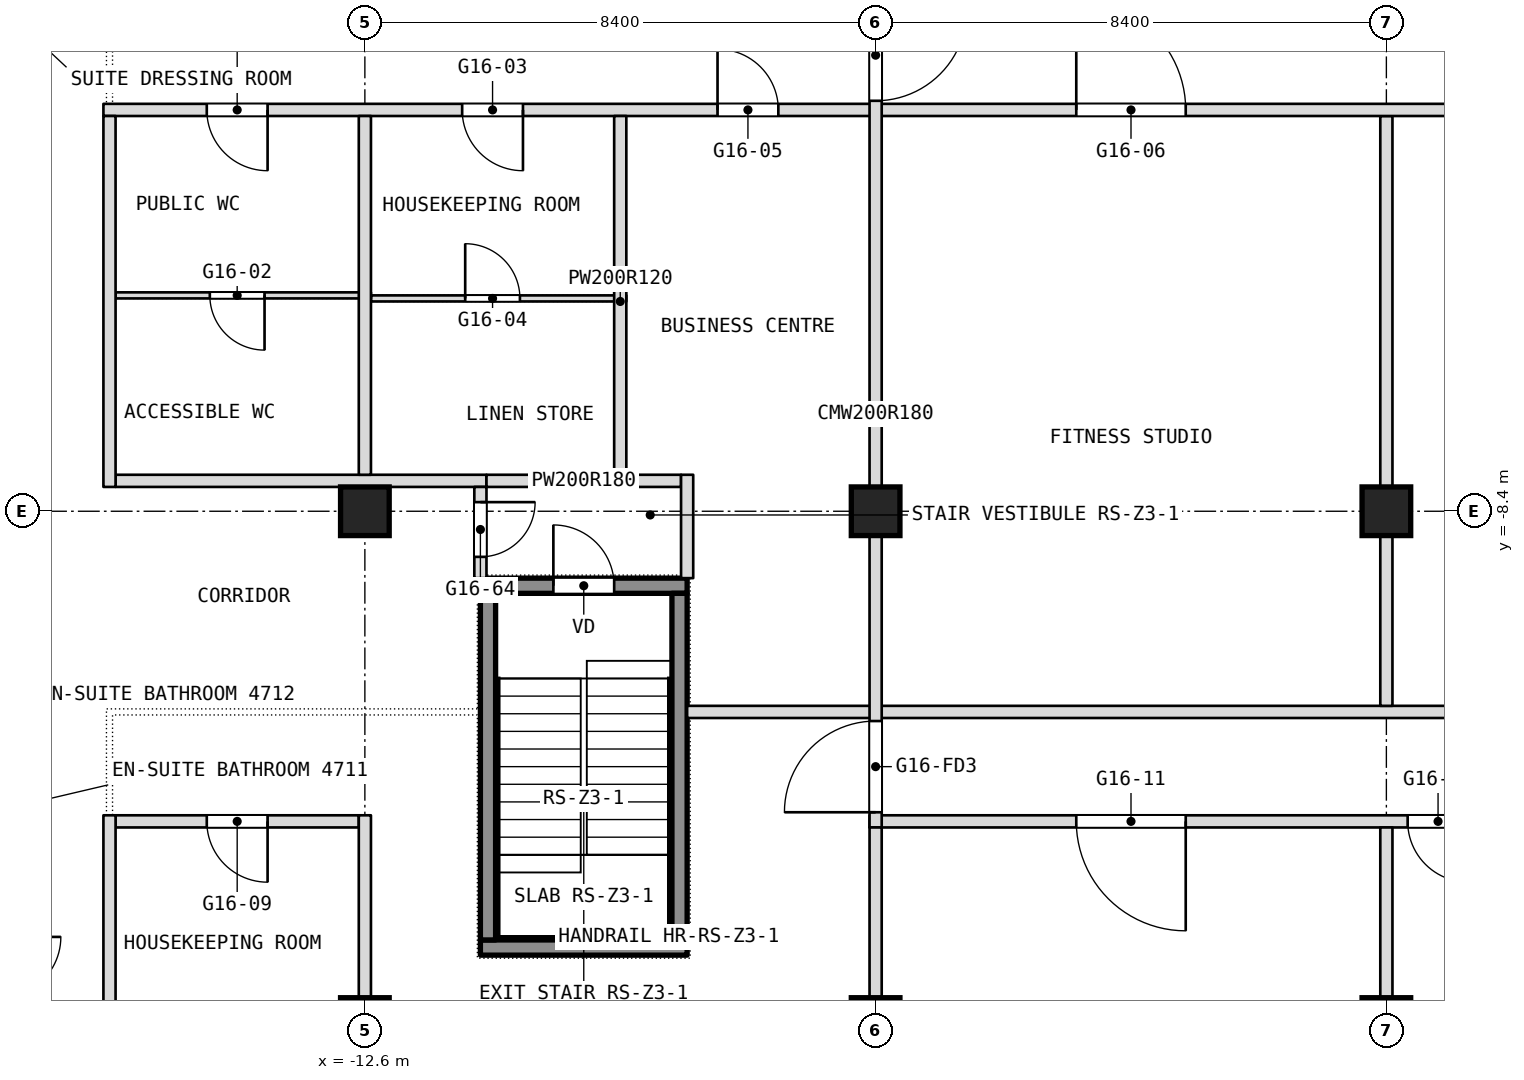
"""IFC4 building model, lengths in metres.
Left out: names, types, materials, properties, quantities, classifications, styles, units other than length and angle.
Written with IfcOpenShell. Run it as: python <this file> out.ifc"""

import sys

from ifc_helpers import new_model, si_unit, direction, frame, frame_2d, origin, origin_2d, place, context, subcontext, project, spatial, rectangle, extrude, element, fill, save


model = new_model("IFC4")
c1 = context("Model", 3, precision=1e-05, world=origin(), true_north=direction((0.0, 1.0)))
c2 = subcontext(c1, "Body", "Model", "MODEL_VIEW")
j1 = project(units=[si_unit("LENGTHUNIT", "METRE"), si_unit("PLANEANGLEUNIT", "RADIAN")], contexts=[c1])
p1 = place(None, origin())
s1 = spatial("IfcSite", under=j1, at=p1, CompositionType="ELEMENT")
p2 = place(p1, origin())
s2 = spatial("IfcBuilding", under=s1, at=p2, CompositionType="ELEMENT")
p3 = place(p2, frame((0.0, 0.0, 205.7)))
s3 = spatial("IfcBuildingStorey", under=s2, at=p3, CompositionType="ELEMENT", Elevation=205.7)
for number, where, z_axis, x_axis in (
    (1, (-12.6, -16.8, 0.0), (0.0, 0.0, 1.0), (1.0, 0.0, 0.0)),
    (2, (-12.6, -8.4, 0.0), (0.0, 0.0, 1.0), (1.0, 0.0, 0.0)),
    (3, (-4.2, -16.8, 0.0), (0.0, 0.0, 1.0), (1.0, 0.0, 0.0)),
    (4, (-4.2, -8.4, 0.0), (0.0, 0.0, 1.0), (1.0, 0.0, 0.0)),
    (5, (4.2, -16.8, 0.0), (0.0, 0.0, 1.0), (1.0, 0.0, 0.0)),
    (6, (4.2, -8.4, 0.0), (0.0, 0.0, 1.0), (1.0, 0.0, 0.0)),
):
    element("IfcColumn", number, at=place(p3, frame(where, z_axis=z_axis, x_axis=x_axis)), inside=s3, PredefinedType="COLUMN", context=c2, shape_type="SweptSolid", body=[
        extrude(rectangle(XDim=0.8, YDim=0.8, at=origin_2d()), origin(), (0.0, 0.0, 1.0), 3.6),
    ])
p4 = place(p3, frame((-16.7, -13.5, 0.0), z_axis=(0.0, 0.0, 1.0), x_axis=(1.0, 0.0, 0.0)))
e7 = element("IfcWall", 7, at=p4, inside=s3, PredefinedType="PARTITIONING", context=c2, shape_type="SweptSolid", body=[
    extrude(rectangle(XDim=4.0, YDim=0.2, at=frame_2d((2.0, 0.0))), origin(), (0.0, 0.0, 1.0), 3.34),
])
p5 = place(p4, frame((1.5, 0.0, 0.0)))
e8 = element("IfcOpeningElement", 8, at=p5, cuts=e7, PredefinedType="OPENING", context=c2, shape_type="SweptSolid", body=[
    extrude(rectangle(XDim=1.0, YDim=2.1, at=frame_2d((0.5, 1.05))), frame((0.0, 0.1, 0.0), z_axis=(0.0, -1.0, 0.0), x_axis=(1.0, 0.0, 0.0)), (0.0, 0.0, 1.0), 0.2),
])
p6 = place(p3, frame((-4.3, -13.5, 0.0), z_axis=(0.0, 0.0, 1.0), x_axis=(1.0, 0.0, 0.0)))
e9 = element("IfcWall", 9, at=p6, inside=s3, PredefinedType="PARTITIONING", context=c2, shape_type="SweptSolid", body=[
    extrude(rectangle(XDim=10.0, YDim=0.2, at=frame_2d((5.0, 0.0))), origin(), (0.0, 0.0, 1.0), 3.34),
])
p7 = place(p6, frame((3.4, 0.0, 0.0)))
e10 = element("IfcOpeningElement", 10, at=p7, cuts=e9, PredefinedType="OPENING", context=c2, shape_type="SweptSolid", body=[
    extrude(rectangle(XDim=1.8, YDim=2.1, at=frame_2d((0.9, 1.05))), frame((0.0, 0.1, 0.0), z_axis=(0.0, -1.0, 0.0), x_axis=(1.0, 0.0, 0.0)), (0.0, 0.0, 1.0), 0.2),
])
p8 = place(p6, frame((8.85, 0.0, 0.0)))
e11 = element("IfcOpeningElement", 11, at=p8, cuts=e9, PredefinedType="OPENING", context=c2, shape_type="SweptSolid", body=[
    extrude(rectangle(XDim=1.0, YDim=2.1, at=frame_2d((0.5, 1.05))), frame((0.0, 0.1, 0.0), z_axis=(0.0, -1.0, 0.0), x_axis=(1.0, 0.0, 0.0)), (0.0, 0.0, 1.0), 0.2),
])
p9 = place(p3, frame((-7.3, -11.7, 0.0), z_axis=(0.0, 0.0, 1.0), x_axis=(1.0, 0.0, 0.0)))
e12 = element("IfcWall", 12, at=p9, inside=s3, PredefinedType="PARTITIONING", context=c2, shape_type="SweptSolid", body=[
    extrude(rectangle(XDim=14.6, YDim=0.2, at=frame_2d((7.3, 0.0))), origin(), (0.0, 0.0, 1.0), 3.34),
])
p10 = place(p3, frame((-16.7, -7.9, 0.0), z_axis=(0.0, 0.0, 1.0), x_axis=(1.0, 0.0, 0.0)))
e13 = element("IfcWall", 13, at=p10, inside=s3, PredefinedType="PARTITIONING", context=c2, shape_type="SweptSolid", body=[
    extrude(rectangle(XDim=6.1, YDim=0.2, at=frame_2d((3.05, 0.0))), origin(), (0.0, 0.0, 1.0), 3.34),
])
p11 = place(p3, frame((-10.6, -7.9, 0.0), z_axis=(0.0, 0.0, 1.0), x_axis=(1.0, 0.0, 0.0)))
e14 = element("IfcWall", 14, at=p11, inside=s3, PredefinedType="PARTITIONING", context=c2, shape_type="SweptSolid", body=[
    extrude(rectangle(XDim=3.2, YDim=0.2, at=frame_2d((1.6, 0.0))), origin(), (0.0, 0.0, 1.0), 3.34),
])
p12 = place(p3, frame((-12.5, -4.9, 0.0), z_axis=(0.0, 0.0, 1.0), x_axis=(1.0, 0.0, 0.0)))
e15 = element("IfcWall", 15, at=p12, inside=s3, PredefinedType="PARTITIONING", context=c2, shape_type="SweptSolid", body=[
    extrude(rectangle(XDim=4.2, YDim=0.1, at=frame_2d((2.1, 0.0))), origin(), (0.0, 0.0, 1.0), 3.34),
])
p13 = place(p12, frame((1.55, 0.0, 0.0)))
e16 = element("IfcOpeningElement", 16, at=p13, cuts=e15, PredefinedType="OPENING", context=c2, shape_type="SweptSolid", body=[
    extrude(rectangle(XDim=0.9, YDim=2.1, at=frame_2d((0.45, 1.05))), frame((0.0, 0.05, 0.0), z_axis=(0.0, -1.0, 0.0), x_axis=(1.0, 0.0, 0.0)), (0.0, 0.0, 1.0), 0.1),
])
p14 = place(p3, frame((-16.7, -4.85, 0.0), z_axis=(0.0, 0.0, 1.0), x_axis=(1.0, 0.0, 0.0)))
e17 = element("IfcWall", 17, at=p14, inside=s3, PredefinedType="PARTITIONING", context=c2, shape_type="SweptSolid", body=[
    extrude(rectangle(XDim=4.2, YDim=0.1, at=frame_2d((2.1, 0.0))), origin(), (0.0, 0.0, 1.0), 3.34),
])
p15 = place(p14, frame((1.55, 0.0, 0.0)))
e18 = element("IfcOpeningElement", 18, at=p15, cuts=e17, PredefinedType="OPENING", context=c2, shape_type="SweptSolid", body=[
    extrude(rectangle(XDim=0.9, YDim=2.1, at=frame_2d((0.45, 1.05))), frame((0.0, 0.05, 0.0), z_axis=(0.0, -1.0, 0.0), x_axis=(1.0, 0.0, 0.0)), (0.0, 0.0, 1.0), 0.1),
])
p16 = place(p3, frame((4.2, -20.0, 0.0), z_axis=(0.0, 0.0, 1.0), x_axis=(0.0, 1.0, 0.0)))
e19 = element("IfcWall", 19, at=p16, inside=s3, PredefinedType="PARTITIONING", context=c2, shape_type="SweptSolid", body=[
    extrude(rectangle(XDim=6.4, YDim=0.2, at=frame_2d((3.2, 0.0))), origin(), (0.0, 0.0, 1.0), 3.34),
])
p17 = place(p3, frame((4.2, -11.6, 0.0), z_axis=(0.0, 0.0, 1.0), x_axis=(0.0, 1.0, 0.0)))
e20 = element("IfcWall", 20, at=p17, inside=s3, PredefinedType="PARTITIONING", context=c2, shape_type="SweptSolid", body=[
    extrude(rectangle(XDim=9.7, YDim=0.2, at=frame_2d((4.85, 0.0))), origin(), (0.0, 0.0, 1.0), 3.34),
])
p18 = place(p3, frame((-16.9, -1.8, 0.0), z_axis=(0.0, 0.0, 1.0), x_axis=(1.0, 0.0, 0.0)))
e21 = element("IfcWall", 21, at=p18, inside=s3, PredefinedType="PARTITIONING", context=c2, shape_type="SweptSolid", body=[
    extrude(rectangle(XDim=33.8, YDim=0.2, at=frame_2d((16.9, 0.0))), origin(), (0.0, 0.0, 1.0), 3.34),
])
p19 = place(p18, frame((1.7, 0.0, 0.0)))
e22 = element("IfcOpeningElement", 22, at=p19, cuts=e21, PredefinedType="OPENING", context=c2, shape_type="SweptSolid", body=[
    extrude(rectangle(XDim=1.0, YDim=2.1, at=frame_2d((0.5, 1.05))), frame((0.0, 0.1, 0.0), z_axis=(0.0, -1.0, 0.0), x_axis=(1.0, 0.0, 0.0)), (0.0, 0.0, 1.0), 0.2),
])
p20 = place(p18, frame((5.9, 0.0, 0.0)))
e23 = element("IfcOpeningElement", 23, at=p20, cuts=e21, PredefinedType="OPENING", context=c2, shape_type="SweptSolid", body=[
    extrude(rectangle(XDim=1.0, YDim=2.1, at=frame_2d((0.5, 1.05))), frame((0.0, 0.1, 0.0), z_axis=(0.0, -1.0, 0.0), x_axis=(1.0, 0.0, 0.0)), (0.0, 0.0, 1.0), 0.2),
])
p21 = place(p18, frame((10.1, 0.0, 0.0)))
e24 = element("IfcOpeningElement", 24, at=p21, cuts=e21, PredefinedType="OPENING", context=c2, shape_type="SweptSolid", body=[
    extrude(rectangle(XDim=1.0, YDim=2.1, at=frame_2d((0.5, 1.05))), frame((0.0, 0.1, 0.0), z_axis=(0.0, -1.0, 0.0), x_axis=(1.0, 0.0, 0.0)), (0.0, 0.0, 1.0), 0.2),
])
p22 = place(p18, frame((16.0, 0.0, 0.0)))
e25 = element("IfcOpeningElement", 25, at=p22, cuts=e21, PredefinedType="OPENING", context=c2, shape_type="SweptSolid", body=[
    extrude(rectangle(XDim=1.8, YDim=2.1, at=frame_2d((0.9, 1.05))), frame((0.0, 0.1, 0.0), z_axis=(0.0, -1.0, 0.0), x_axis=(1.0, 0.0, 0.0)), (0.0, 0.0, 1.0), 0.2),
])
p23 = place(p18, frame((24.4, 0.0, 0.0)))
e26 = element("IfcOpeningElement", 26, at=p23, cuts=e21, PredefinedType="OPENING", context=c2, shape_type="SweptSolid", body=[
    extrude(rectangle(XDim=1.8, YDim=2.1, at=frame_2d((0.9, 1.05))), frame((0.0, 0.1, 0.0), z_axis=(0.0, -1.0, 0.0), x_axis=(1.0, 0.0, 0.0)), (0.0, 0.0, 1.0), 0.2),
])
p24 = place(p18, frame((31.1, 0.0, 0.0)))
e27 = element("IfcOpeningElement", 27, at=p24, cuts=e21, PredefinedType="OPENING", context=c2, shape_type="SweptSolid", body=[
    extrude(rectangle(XDim=1.0, YDim=2.1, at=frame_2d((0.5, 1.05))), frame((0.0, 0.1, 0.0), z_axis=(0.0, -1.0, 0.0), x_axis=(1.0, 0.0, 0.0)), (0.0, 0.0, 1.0), 0.2),
])
p25 = place(p3, frame((-4.2, -13.6, 0.0), z_axis=(0.0, 0.0, 1.0), x_axis=(0.0, 1.0, 0.0)))
e28 = element("IfcWall", 28, at=p25, inside=s3, PredefinedType="PARTITIONING", context=c2, shape_type="SweptSolid", body=[
    extrude(rectangle(XDim=13.6, YDim=0.2, at=frame_2d((6.8, 0.0))), origin(), (0.0, 0.0, 1.0), 3.34),
])
p26 = place(p25, frame((11.95, 0.0, 0.0)))
e29 = element("IfcOpeningElement", 29, at=p26, cuts=e28, PredefinedType="OPENING", context=c2, shape_type="SweptSolid", body=[
    extrude(rectangle(XDim=1.5, YDim=2.1, at=frame_2d((0.75, 1.05))), frame((0.0, 0.1, 0.0), z_axis=(0.0, -1.0, 0.0), x_axis=(1.0, 0.0, 0.0)), (0.0, 0.0, 1.0), 0.2),
])
p27 = place(p25, frame((0.25, 0.0, 0.0)))
e30 = element("IfcOpeningElement", 30, at=p27, cuts=e28, PredefinedType="OPENING", context=c2, shape_type="SweptSolid", body=[
    extrude(rectangle(XDim=1.5, YDim=2.1, at=frame_2d((0.75, 1.05))), frame((0.0, 0.1, 0.0), z_axis=(0.0, -1.0, 0.0), x_axis=(1.0, 0.0, 0.0)), (0.0, 0.0, 1.0), 0.2),
])
p28 = place(p3, frame((-4.2, -22.0, 0.0), z_axis=(0.0, 0.0, 1.0), x_axis=(0.0, 1.0, 0.0)))
e31 = element("IfcWall", 31, at=p28, inside=s3, PredefinedType="PARTITIONING", context=c2, shape_type="SweptSolid", body=[
    extrude(rectangle(XDim=8.4, YDim=0.2, at=frame_2d((4.2, 0.0))), origin(), (0.0, 0.0, 1.0), 3.34),
])
p29 = place(p28, frame((0.225, 0.0, 0.0)))
e32 = element("IfcOpeningElement", 32, at=p29, cuts=e31, PredefinedType="OPENING", context=c2, shape_type="SweptSolid", body=[
    extrude(rectangle(XDim=1.5, YDim=2.1, at=frame_2d((0.75, 1.05))), frame((0.0, 0.1, 0.0), z_axis=(0.0, -1.0, 0.0), x_axis=(1.0, 0.0, 0.0)), (0.0, 0.0, 1.0), 0.2),
])
p30 = place(p3, frame((-7.3, -9.5, 0.0), z_axis=(0.0, 0.0, 1.0), x_axis=(0.0, 1.0, 0.0)))
e33 = element("IfcWall", 33, at=p30, inside=s3, PredefinedType="PARTITIONING", context=c2, shape_type="SweptSolid", body=[
    extrude(rectangle(XDim=1.7, YDim=0.2, at=frame_2d((0.85, 0.0))), origin(), (0.0, 0.0, 1.0), 3.34),
])
p31 = place(p3, frame((-8.4, -8.0, 0.0), z_axis=(0.0, 0.0, 1.0), x_axis=(0.0, 1.0, 0.0)))
e34 = element("IfcWall", 34, at=p31, inside=s3, PredefinedType="PARTITIONING", context=c2, shape_type="SweptSolid", body=[
    extrude(rectangle(XDim=6.1, YDim=0.2, at=frame_2d((3.05, 0.0))), origin(), (0.0, 0.0, 1.0), 3.34),
])
p32 = place(p3, frame((-10.7, -9.5, 0.0), z_axis=(0.0, 0.0, 1.0), x_axis=(0.0, 1.0, 0.0)))
e35 = element("IfcWall", 35, at=p32, inside=s3, PredefinedType="PARTITIONING", context=c2, shape_type="SweptSolid", body=[
    extrude(rectangle(XDim=1.5, YDim=0.2, at=frame_2d((0.75, 0.0))), origin(), (0.0, 0.0, 1.0), 3.34),
])
p33 = place(p32, frame((0.35, 0.0, 0.0)))
e36 = element("IfcOpeningElement", 36, at=p33, cuts=e35, PredefinedType="OPENING", context=c2, shape_type="SweptSolid", body=[
    extrude(rectangle(XDim=0.9, YDim=2.1, at=frame_2d((0.45, 1.05))), frame((0.0, 0.1, 0.0), z_axis=(0.0, -1.0, 0.0), x_axis=(1.0, 0.0, 0.0)), (0.0, 0.0, 1.0), 0.2),
])
p34 = place(p3, frame((-12.6, -7.8, 0.0), z_axis=(0.0, 0.0, 1.0), x_axis=(0.0, 1.0, 0.0)))
e37 = element("IfcWall", 37, at=p34, inside=s3, PredefinedType="PARTITIONING", context=c2, shape_type="SweptSolid", body=[
    extrude(rectangle(XDim=5.9, YDim=0.2, at=frame_2d((2.95, 0.0))), origin(), (0.0, 0.0, 1.0), 3.34),
])
for number, where, z_axis, x_axis in (
    (38, (-12.6, -20.2, 0.0), (0.0, 0.0, 1.0), (0.0, 1.0, 0.0)),
    (39, (-16.8, -20.2, 0.0), (0.0, 0.0, 1.0), (0.0, 1.0, 0.0)),
):
    element("IfcWall", number, at=place(p3, frame(where, z_axis=z_axis, x_axis=x_axis)), inside=s3, PredefinedType="PARTITIONING", context=c2, shape_type="SweptSolid", body=[
        extrude(rectangle(XDim=6.8, YDim=0.2, at=frame_2d((3.4, 0.0))), origin(), (0.0, 0.0, 1.0), 3.34),
    ])
p35 = place(p3, frame((-16.8, -8.0, 0.0), z_axis=(0.0, 0.0, 1.0), x_axis=(0.0, 1.0, 0.0)))
e40 = element("IfcWall", 40, at=p35, inside=s3, PredefinedType="PARTITIONING", context=c2, shape_type="SweptSolid", body=[
    extrude(rectangle(XDim=6.1, YDim=0.2, at=frame_2d((3.05, 0.0))), origin(), (0.0, 0.0, 1.0), 3.34),
])
p36 = place(p3, frame((-10.7, -15.575, 0.1), z_axis=(0.0, 0.0, 1.0), x_axis=(1.0, 0.0, 0.0)))
e41 = element("IfcWall", 41, at=p36, inside=s3, PredefinedType="SHEAR", context=c2, shape_type="SweptSolid", body=[
    extrude(rectangle(XDim=3.4, YDim=0.25, at=frame_2d((1.7, 0.0))), origin(), (0.0, 0.0, 1.0), 3.6),
])
p37 = place(p3, frame((-10.7, -9.625, 0.1), z_axis=(0.0, 0.0, 1.0), x_axis=(1.0, 0.0, 0.0)))
e42 = element("IfcWall", 42, at=p37, inside=s3, PredefinedType="SHEAR", context=c2, shape_type="SweptSolid", body=[
    extrude(rectangle(XDim=3.4, YDim=0.25, at=frame_2d((1.7, 0.0))), origin(), (0.0, 0.0, 1.0), 3.6),
])
p38 = place(p37, frame((1.2, 0.0, 0.0)))
e43 = element("IfcOpeningElement", 43, at=p38, cuts=e42, PredefinedType="OPENING", context=c2, shape_type="SweptSolid", body=[
    extrude(rectangle(XDim=1.0, YDim=2.1, at=frame_2d((0.5, 1.05))), frame((0.0, 0.125, 0.0), z_axis=(0.0, -1.0, 0.0), x_axis=(1.0, 0.0, 0.0)), (0.0, 0.0, 1.0), 0.25),
])
for number, where, z_axis, x_axis in (
    (44, (-10.575, -15.45, 0.1), (0.0, 0.0, 1.0), (0.0, 1.0, 0.0)),
    (45, (-7.425, -15.45, 0.1), (0.0, 0.0, 1.0), (0.0, 1.0, 0.0)),
):
    element("IfcWall", number, at=place(p3, frame(where, z_axis=z_axis, x_axis=x_axis)), inside=s3, PredefinedType="SHEAR", context=c2, shape_type="SweptSolid", body=[
        extrude(rectangle(XDim=5.7, YDim=0.25, at=frame_2d((2.85, 0.0))), origin(), (0.0, 0.0, 1.0), 3.6),
    ])
p39 = place(p5, origin())
e46 = element("IfcDoor", 46, at=p39, inside=s3, OperationType="SINGLE_SWING_LEFT", PredefinedType="DOOR", context=c2, shape_type="SweptSolid", body=[
    extrude(rectangle(XDim=1.0, YDim=2.1, at=frame_2d((0.5, 1.05))), frame((0.0, 0.025, 0.0), z_axis=(0.0, -1.0, 0.0), x_axis=(1.0, 0.0, 0.0)), (0.0, 0.0, 1.0), 0.05),
])
fill(e8, e46)
p40 = place(p7, origin())
e47 = element("IfcDoor", 47, at=p40, inside=s3, OperationType="DOUBLE_DOOR_SINGLE_SWING", PredefinedType="DOOR", context=c2, shape_type="SweptSolid", body=[
    extrude(rectangle(XDim=1.8, YDim=2.1, at=frame_2d((0.9, 1.05))), frame((0.0, 0.025, 0.0), z_axis=(0.0, -1.0, 0.0), x_axis=(1.0, 0.0, 0.0)), (0.0, 0.0, 1.0), 0.05),
])
fill(e10, e47)
p41 = place(p8, origin())
e48 = element("IfcDoor", 48, at=p41, inside=s3, OperationType="SINGLE_SWING_LEFT", PredefinedType="DOOR", context=c2, shape_type="SweptSolid", body=[
    extrude(rectangle(XDim=1.0, YDim=2.1, at=frame_2d((0.5, 1.05))), frame((0.0, 0.025, 0.0), z_axis=(0.0, -1.0, 0.0), x_axis=(1.0, 0.0, 0.0)), (0.0, 0.0, 1.0), 0.05),
])
fill(e11, e48)
p42 = place(p13, origin())
e49 = element("IfcDoor", 49, at=p42, inside=s3, OperationType="SINGLE_SWING_RIGHT", PredefinedType="DOOR", context=c2, shape_type="SweptSolid", body=[
    extrude(rectangle(XDim=0.9, YDim=2.1, at=frame_2d((0.45, 1.05))), frame((0.0, 0.025, 0.0), z_axis=(0.0, -1.0, 0.0), x_axis=(1.0, 0.0, 0.0)), (0.0, 0.0, 1.0), 0.05),
])
fill(e16, e49)
p43 = place(p15, origin())
e50 = element("IfcDoor", 50, at=p43, inside=s3, OperationType="SINGLE_SWING_RIGHT", PredefinedType="DOOR", context=c2, shape_type="SweptSolid", body=[
    extrude(rectangle(XDim=0.9, YDim=2.1, at=frame_2d((0.45, 1.05))), frame((0.0, 0.025, 0.0), z_axis=(0.0, -1.0, 0.0), x_axis=(1.0, 0.0, 0.0)), (0.0, 0.0, 1.0), 0.05),
])
fill(e18, e50)
p44 = place(p19, origin())
e51 = element("IfcDoor", 51, at=p44, inside=s3, OperationType="SINGLE_SWING_LEFT", PredefinedType="DOOR", context=c2, shape_type="SweptSolid", body=[
    extrude(rectangle(XDim=1.0, YDim=2.1, at=frame_2d((0.5, 1.05))), frame((0.0, 0.025, 0.0), z_axis=(0.0, -1.0, 0.0), x_axis=(1.0, 0.0, 0.0)), (0.0, 0.0, 1.0), 0.05),
])
fill(e22, e51)
p45 = place(p20, origin())
e52 = element("IfcDoor", 52, at=p45, inside=s3, OperationType="SINGLE_SWING_LEFT", PredefinedType="DOOR", context=c2, shape_type="SweptSolid", body=[
    extrude(rectangle(XDim=1.0, YDim=2.1, at=frame_2d((0.5, 1.05))), frame((0.0, 0.025, 0.0), z_axis=(0.0, -1.0, 0.0), x_axis=(1.0, 0.0, 0.0)), (0.0, 0.0, 1.0), 0.05),
])
fill(e23, e52)
p46 = place(p21, origin())
e53 = element("IfcDoor", 53, at=p46, inside=s3, OperationType="SINGLE_SWING_RIGHT", PredefinedType="DOOR", context=c2, shape_type="SweptSolid", body=[
    extrude(rectangle(XDim=1.0, YDim=2.1, at=frame_2d((0.5, 1.05))), frame((0.0, 0.025, 0.0), z_axis=(0.0, -1.0, 0.0), x_axis=(1.0, 0.0, 0.0)), (0.0, 0.0, 1.0), 0.05),
])
fill(e24, e53)
p47 = place(p22, origin())
e54 = element("IfcDoor", 54, at=p47, inside=s3, OperationType="DOUBLE_DOOR_SINGLE_SWING", PredefinedType="DOOR", context=c2, shape_type="SweptSolid", body=[
    extrude(rectangle(XDim=1.8, YDim=2.1, at=frame_2d((0.9, 1.05))), frame((0.0, 0.025, 0.0), z_axis=(0.0, -1.0, 0.0), x_axis=(1.0, 0.0, 0.0)), (0.0, 0.0, 1.0), 0.05),
])
fill(e25, e54)
p48 = place(p33, origin())
e55 = element("IfcDoor", 55, at=p48, inside=s3, OperationType="SINGLE_SWING_LEFT", PredefinedType="DOOR", context=c2, shape_type="SweptSolid", body=[
    extrude(rectangle(XDim=0.9, YDim=2.1, at=frame_2d((0.45, 1.05))), frame((0.0, 0.025, 0.0), z_axis=(0.0, -1.0, 0.0), x_axis=(1.0, 0.0, 0.0)), (0.0, 0.0, 1.0), 0.05),
])
fill(e36, e55)
p49 = place(p38, origin())
e56 = element("IfcDoor", 56, at=p49, inside=s3, OperationType="SINGLE_SWING_LEFT", PredefinedType="DOOR", context=c2, shape_type="SweptSolid", body=[
    extrude(rectangle(XDim=1.0, YDim=2.1, at=frame_2d((0.5, 1.05))), frame((0.0, 0.025, 0.0), z_axis=(0.0, -1.0, 0.0), x_axis=(1.0, 0.0, 0.0)), (0.0, 0.0, 1.0), 0.05),
])
fill(e43, e56)
p50 = place(p26, origin())
e57 = element("IfcDoor", 57, at=p50, inside=s3, OperationType="DOUBLE_DOOR_DOUBLE_SWING", PredefinedType="DOOR", context=c2, shape_type="SweptSolid", body=[
    extrude(rectangle(XDim=1.5, YDim=2.1, at=frame_2d((0.75, 1.05))), frame((0.0, 0.025, 0.0), z_axis=(0.0, -1.0, 0.0), x_axis=(1.0, 0.0, 0.0)), (0.0, 0.0, 1.0), 0.05),
])
fill(e29, e57)
p51 = place(p27, origin())
e58 = element("IfcDoor", 58, at=p51, inside=s3, OperationType="DOUBLE_DOOR_DOUBLE_SWING", PredefinedType="DOOR", context=c2, shape_type="SweptSolid", body=[
    extrude(rectangle(XDim=1.5, YDim=2.1, at=frame_2d((0.75, 1.05))), frame((0.0, 0.025, 0.0), z_axis=(0.0, -1.0, 0.0), x_axis=(1.0, 0.0, 0.0)), (0.0, 0.0, 1.0), 0.05),
])
fill(e30, e58)
save(model, sys.argv[1])
